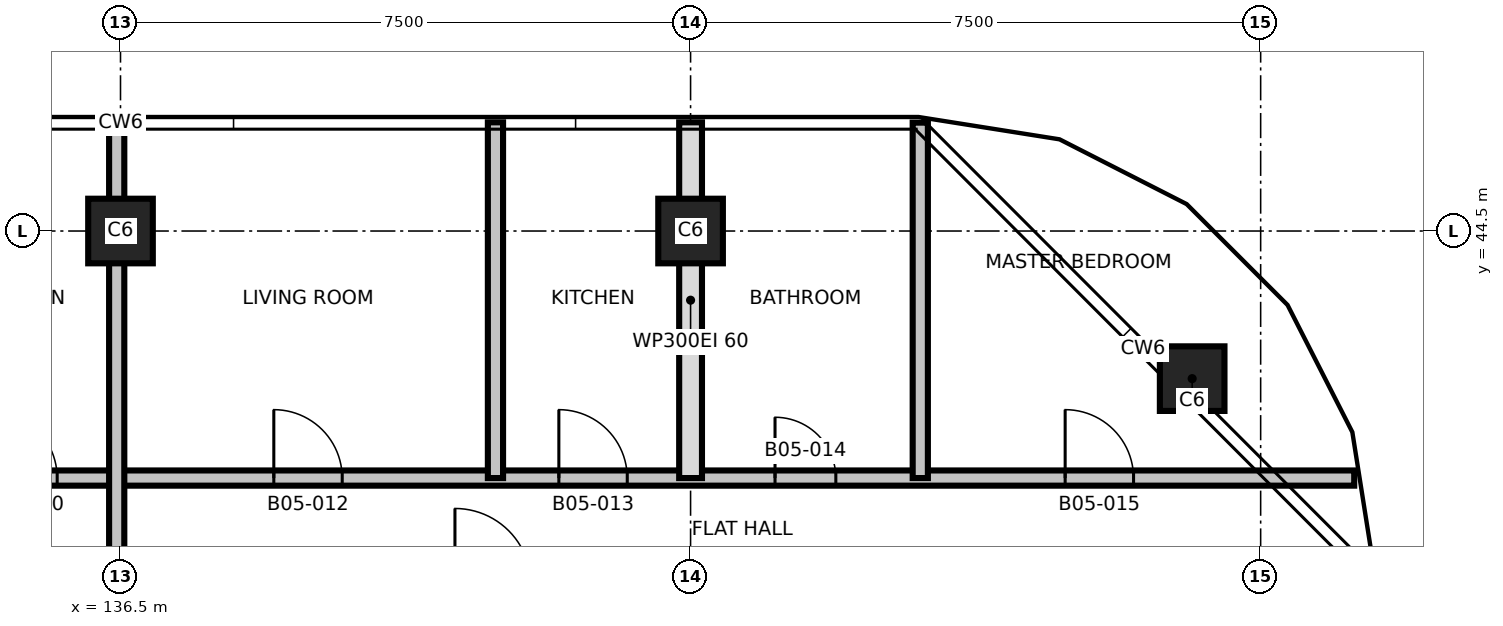
"""IFC4 building model, lengths in metres.
Left out: names, types, materials, properties, quantities, classifications, styles, units other than length and angle.
Written with IfcOpenShell. Run it as: python <this file> out.ifc"""

import sys

from ifc_helpers import new_model, si_unit, direction, frame, frame_2d, origin, origin_2d, place, context, subcontext, project, spatial, rectangle, extrude, element, fill, save


model = new_model("IFC4")
c1 = context("Model", 3, precision=1e-05, world=origin(), true_north=direction((0.0, 1.0)))
c2 = subcontext(c1, "Body", "Model", "MODEL_VIEW")
j1 = project(units=[si_unit("LENGTHUNIT", "METRE"), si_unit("PLANEANGLEUNIT", "RADIAN")], contexts=[c1])
p1 = place(None, origin())
s1 = spatial("IfcSite", under=j1, at=p1, CompositionType="ELEMENT")
p2 = place(p1, origin())
s2 = spatial("IfcBuilding", under=s1, at=p2, CompositionType="ELEMENT")
p3 = place(p2, frame((0.0, 0.0, 70.5)))
s3 = spatial("IfcBuildingStorey", under=s2, at=p3, CompositionType="ELEMENT", Elevation=70.5)
for number, where, z_axis, x_axis in (
    (1, (150.599, 42.558, 0.0), (0.0, 0.0, 1.0), (1.0, 0.0, 0.0)),
    (2, (136.5, 44.5, 0.0), (0.0, 0.0, 1.0), (1.0, 0.0, 0.0)),
    (3, (144.0, 44.5, 0.0), (0.0, 0.0, 1.0), (1.0, 0.0, 0.0)),
):
    element("IfcColumn", number, at=place(p3, frame(where, z_axis=z_axis, x_axis=x_axis)), inside=s3, PredefinedType="COLUMN", context=c2, shape_type="SweptSolid", body=[
        extrude(rectangle(XDim=0.85, YDim=0.85, at=origin_2d()), origin(), (0.0, 0.0, 1.0), 3.7),
    ])
p4 = place(p3, frame((120.269, 41.25, 0.0), z_axis=(0.0, 0.0, 1.0), x_axis=(1.0, 0.0, 0.0)))
e4 = element("IfcWall", 4, at=p4, inside=s3, PredefinedType="PARTITIONING", context=c2, shape_type="SweptSolid", body=[
    extrude(rectangle(XDim=32.462, YDim=0.2, at=frame_2d((16.231, 0.0))), origin(), (0.0, 0.0, 1.0), 3.4),
])
p5 = place(p4, frame((0.414, 0.0, 0.0)))
e5 = element("IfcOpeningElement", 5, at=p5, cuts=e4, PredefinedType="OPENING", context=c2, shape_type="SweptSolid", body=[
    extrude(rectangle(XDim=0.9, YDim=2.1, at=frame_2d((0.45, 1.05))), frame((0.0, 0.11, 0.0), z_axis=(0.0, -1.0, 0.0), x_axis=(1.0, 0.0, 0.0)), (0.0, 0.0, 1.0), 0.22),
])
p6 = place(p4, frame((4.581, 0.0, 0.0)))
e6 = element("IfcOpeningElement", 6, at=p6, cuts=e4, PredefinedType="OPENING", context=c2, shape_type="SweptSolid", body=[
    extrude(rectangle(XDim=0.9, YDim=2.1, at=frame_2d((0.45, 1.05))), frame((0.0, 0.11, 0.0), z_axis=(0.0, -1.0, 0.0), x_axis=(1.0, 0.0, 0.0)), (0.0, 0.0, 1.0), 0.22),
])
p7 = place(p4, frame((7.381, 0.0, 0.0)))
e7 = element("IfcOpeningElement", 7, at=p7, cuts=e4, PredefinedType="OPENING", context=c2, shape_type="SweptSolid", body=[
    extrude(rectangle(XDim=0.8, YDim=2.1, at=frame_2d((0.4, 1.05))), frame((0.0, 0.11, 0.0), z_axis=(0.0, -1.0, 0.0), x_axis=(1.0, 0.0, 0.0)), (0.0, 0.0, 1.0), 0.22),
])
p8 = place(p4, frame((10.748, 0.0, 0.0)))
e8 = element("IfcOpeningElement", 8, at=p8, cuts=e4, PredefinedType="OPENING", context=c2, shape_type="SweptSolid", body=[
    extrude(rectangle(XDim=0.9, YDim=2.1, at=frame_2d((0.45, 1.05))), frame((0.0, 0.11, 0.0), z_axis=(0.0, -1.0, 0.0), x_axis=(1.0, 0.0, 0.0)), (0.0, 0.0, 1.0), 0.22),
])
p9 = place(p4, frame((14.498, 0.0, 0.0)))
e9 = element("IfcOpeningElement", 9, at=p9, cuts=e4, PredefinedType="OPENING", context=c2, shape_type="SweptSolid", body=[
    extrude(rectangle(XDim=0.9, YDim=2.1, at=frame_2d((0.45, 1.05))), frame((0.0, 0.11, 0.0), z_axis=(0.0, -1.0, 0.0), x_axis=(1.0, 0.0, 0.0)), (0.0, 0.0, 1.0), 0.22),
])
p10 = place(p4, frame((18.248, 0.0, 0.0)))
e10 = element("IfcOpeningElement", 10, at=p10, cuts=e4, PredefinedType="OPENING", context=c2, shape_type="SweptSolid", body=[
    extrude(rectangle(XDim=0.9, YDim=2.1, at=frame_2d((0.45, 1.05))), frame((0.0, 0.11, 0.0), z_axis=(0.0, -1.0, 0.0), x_axis=(1.0, 0.0, 0.0)), (0.0, 0.0, 1.0), 0.22),
])
p11 = place(p4, frame((21.998, 0.0, 0.0)))
e11 = element("IfcOpeningElement", 11, at=p11, cuts=e4, PredefinedType="OPENING", context=c2, shape_type="SweptSolid", body=[
    extrude(rectangle(XDim=0.9, YDim=2.1, at=frame_2d((0.45, 1.05))), frame((0.0, 0.11, 0.0), z_axis=(0.0, -1.0, 0.0), x_axis=(1.0, 0.0, 0.0)), (0.0, 0.0, 1.0), 0.22),
])
p12 = place(p4, frame((24.842, 0.0, 0.0)))
e12 = element("IfcOpeningElement", 12, at=p12, cuts=e4, PredefinedType="OPENING", context=c2, shape_type="SweptSolid", body=[
    extrude(rectangle(XDim=0.8, YDim=2.1, at=frame_2d((0.4, 1.05))), frame((0.0, 0.11, 0.0), z_axis=(0.0, -1.0, 0.0), x_axis=(1.0, 0.0, 0.0)), (0.0, 0.0, 1.0), 0.22),
])
p13 = place(p4, frame((28.659, 0.0, 0.0)))
e13 = element("IfcOpeningElement", 13, at=p13, cuts=e4, PredefinedType="OPENING", context=c2, shape_type="SweptSolid", body=[
    extrude(rectangle(XDim=0.9, YDim=2.1, at=frame_2d((0.45, 1.05))), frame((0.0, 0.11, 0.0), z_axis=(0.0, -1.0, 0.0), x_axis=(1.0, 0.0, 0.0)), (0.0, 0.0, 1.0), 0.22),
])
p14 = place(p3, frame((136.45, 39.85, 0.0), z_axis=(0.0, 0.0, 1.0), x_axis=(0.0, 1.0, 0.0)))
e14 = element("IfcWall", 14, at=p14, inside=s3, PredefinedType="PARTITIONING", context=c2, shape_type="SweptSolid", body=[
    extrude(rectangle(XDim=6.08, YDim=0.2, at=frame_2d((3.04, 0.0))), origin(), (0.0, 0.0, 1.0), 3.4),
])
p15 = place(p3, frame((141.433, 41.25, 0.0), z_axis=(0.0, 0.0, 1.0), x_axis=(0.0, 1.0, 0.0)))
e15 = element("IfcWall", 15, at=p15, inside=s3, PredefinedType="PARTITIONING", context=c2, shape_type="SweptSolid", body=[
    extrude(rectangle(XDim=4.68, YDim=0.2, at=frame_2d((2.34, 0.0))), origin(), (0.0, 0.0, 1.0), 3.4),
])
p16 = place(p3, frame((144.0, 41.25, 0.0), z_axis=(0.0, 0.0, 1.0), x_axis=(0.0, 1.0, 0.0)))
e16 = element("IfcWall", 16, at=p16, inside=s3, PredefinedType="PARTITIONING", context=c2, shape_type="SweptSolid", body=[
    extrude(rectangle(XDim=4.68, YDim=0.3, at=frame_2d((2.34, 0.0))), origin(), (0.0, 0.0, 1.0), 3.4),
])
p17 = place(p3, frame((147.022, 41.25, 0.0), z_axis=(0.0, 0.0, 1.0), x_axis=(0.0, 1.0, 0.0)))
e17 = element("IfcWall", 17, at=p17, inside=s3, PredefinedType="PARTITIONING", context=c2, shape_type="SweptSolid", body=[
    extrude(rectangle(XDim=4.676, YDim=0.2, at=frame_2d((2.338, 0.0))), origin(), (0.0, 0.0, 1.0), 3.4),
])
p18 = place(p9, origin())
e18 = element("IfcDoor", 18, at=p18, inside=s3, OperationType="SINGLE_SWING_RIGHT", PredefinedType="DOOR", context=c2, shape_type="SweptSolid", body=[
    extrude(rectangle(XDim=0.9, YDim=2.1, at=frame_2d((0.45, 1.05))), frame((0.0, 0.025, 0.0), z_axis=(0.0, -1.0, 0.0), x_axis=(1.0, 0.0, 0.0)), (0.0, 0.0, 1.0), 0.05),
])
fill(e9, e18)
p19 = place(p10, origin())
e19 = element("IfcDoor", 19, at=p19, inside=s3, OperationType="SINGLE_SWING_RIGHT", PredefinedType="DOOR", context=c2, shape_type="SweptSolid", body=[
    extrude(rectangle(XDim=0.9, YDim=2.1, at=frame_2d((0.45, 1.05))), frame((0.0, 0.025, 0.0), z_axis=(0.0, -1.0, 0.0), x_axis=(1.0, 0.0, 0.0)), (0.0, 0.0, 1.0), 0.05),
])
fill(e10, e19)
p20 = place(p11, origin())
e20 = element("IfcDoor", 20, at=p20, inside=s3, OperationType="SINGLE_SWING_LEFT", PredefinedType="DOOR", context=c2, shape_type="SweptSolid", body=[
    extrude(rectangle(XDim=0.9, YDim=2.1, at=frame_2d((0.45, 1.05))), frame((0.0, 0.025, 0.0), z_axis=(0.0, -1.0, 0.0), x_axis=(1.0, 0.0, 0.0)), (0.0, 0.0, 1.0), 0.05),
])
fill(e11, e20)
p21 = place(p12, origin())
e21 = element("IfcDoor", 21, at=p21, inside=s3, OperationType="SINGLE_SWING_RIGHT", PredefinedType="DOOR", context=c2, shape_type="SweptSolid", body=[
    extrude(rectangle(XDim=0.8, YDim=2.1, at=frame_2d((0.4, 1.05))), frame((0.0, 0.025, 0.0), z_axis=(0.0, -1.0, 0.0), x_axis=(1.0, 0.0, 0.0)), (0.0, 0.0, 1.0), 0.05),
])
fill(e12, e21)
p22 = place(p13, origin())
e22 = element("IfcDoor", 22, at=p22, inside=s3, OperationType="SINGLE_SWING_LEFT", PredefinedType="DOOR", context=c2, shape_type="SweptSolid", body=[
    extrude(rectangle(XDim=0.9, YDim=2.1, at=frame_2d((0.45, 1.05))), frame((0.0, 0.025, 0.0), z_axis=(0.0, -1.0, 0.0), x_axis=(1.0, 0.0, 0.0)), (0.0, 0.0, 1.0), 0.05),
])
fill(e13, e22)
save(model, sys.argv[1])
